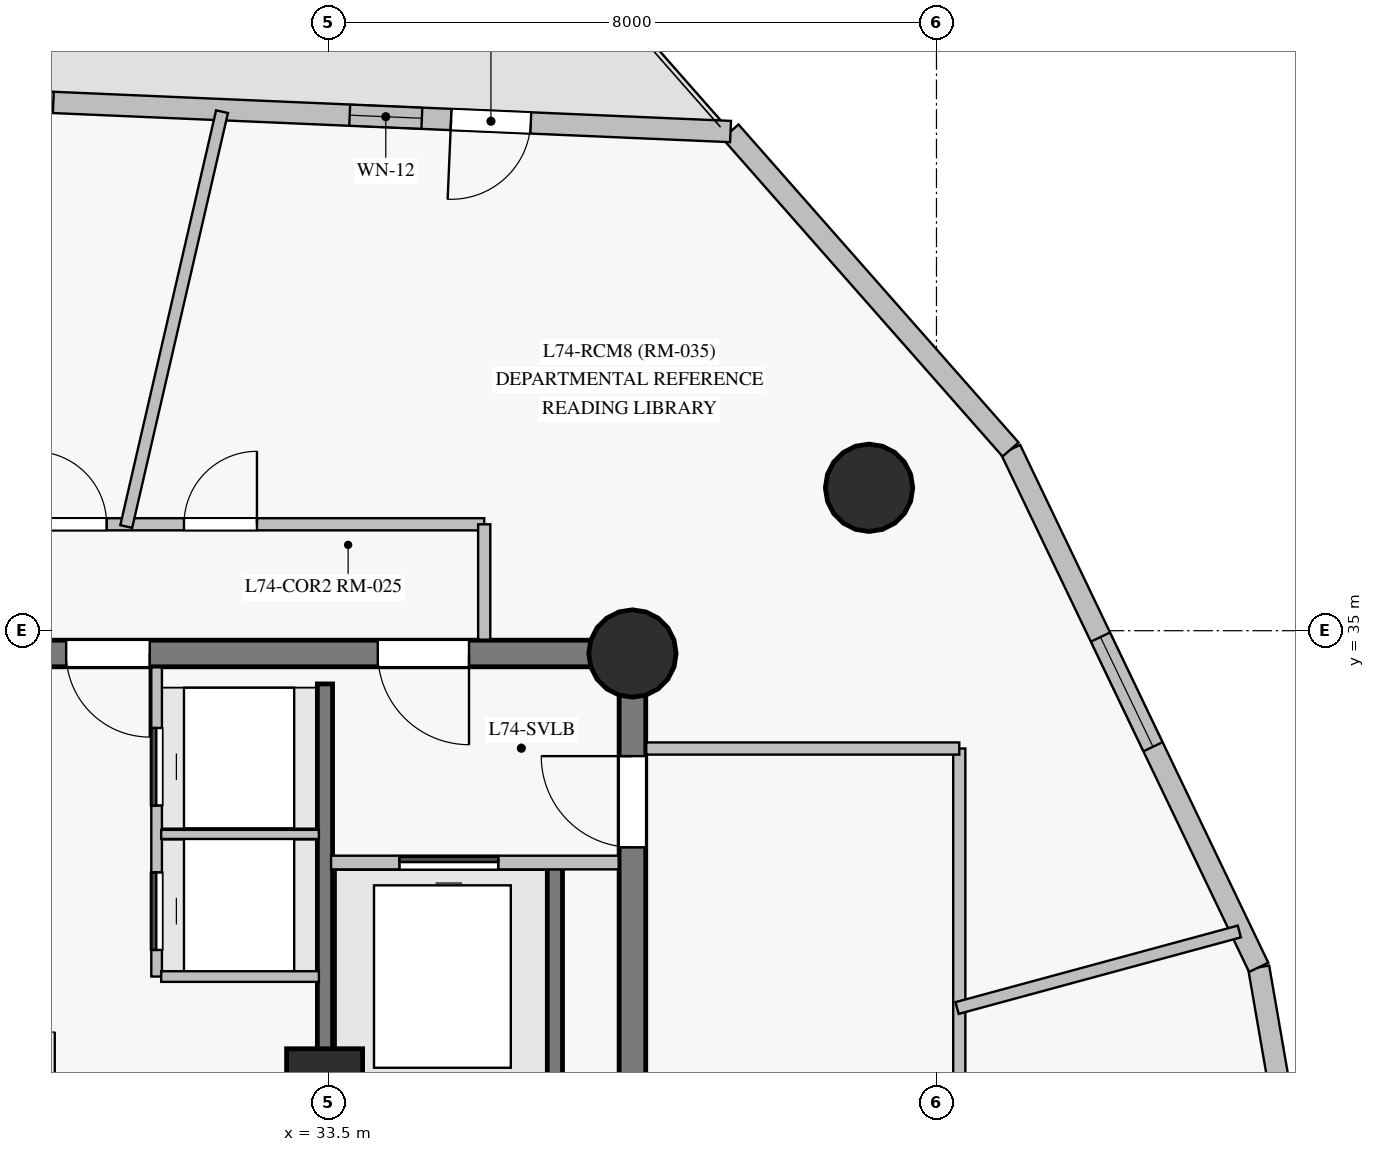
"""IFC4 building model, lengths in metres.
Left out: names, types, materials, properties, quantities, classifications, styles, units other than length and angle.
Written with IfcOpenShell. Run it as: python <this file> out.ifc"""

import sys

from ifc_helpers import new_model, si_unit, direction, frame, frame_2d, origin, origin_with_axes, origin_2d, place, context, subcontext, project, spatial, rectangle, circle, extrude, source, transform, mapped, element, fill, save


model = new_model("IFC4")
c1 = context("Model", 3, precision=1e-05, world=origin(), true_north=direction((0.0, 1.0)))
c2 = subcontext(c1, "Body", "Model", "MODEL_VIEW")
j1 = project(units=[si_unit("LENGTHUNIT", "METRE"), si_unit("PLANEANGLEUNIT", "RADIAN")], contexts=[c1])
p1 = place(None, origin())
s1 = spatial("IfcSite", under=j1, at=p1, CompositionType="ELEMENT")
p2 = place(p1, origin())
s2 = spatial("IfcBuilding", under=s1, at=p2, CompositionType="ELEMENT")
p3 = place(p2, frame((0.0, 0.0, 250.45)))
s3 = spatial("IfcBuildingStorey", under=s2, at=p3, CompositionType="ELEMENT", Elevation=250.45)
p4 = place(p3, frame((37.5, 18.3, 0.0), z_axis=(0.0, 0.0, 1.0), x_axis=(0.0, 1.0, 0.0)))
e1 = element("IfcWall", 1, at=p4, inside=s3, PredefinedType="SHEAR", context=c2, shape_type="SweptSolid", body=[
    extrude(rectangle(XDim=16.4, YDim=0.35, at=frame_2d((8.2, 0.0))), origin(), (0.0, 0.0, 1.0), 2.85),
])
p5 = place(p4, frame((13.85, 0.0, 0.0)))
e2 = element("IfcOpeningElement", 2, at=p5, cuts=e1, PredefinedType="OPENING", context=c2, shape_type="SweptSolid", body=[
    extrude(rectangle(XDim=1.2, YDim=2.15, at=frame_2d((0.6, 1.075))), frame((0.0, 0.185, 0.0), z_axis=(0.0, -1.0, 0.0), x_axis=(1.0, 0.0, 0.0)), (0.0, 0.0, 1.0), 0.37),
])
p6 = place(p3, frame((37.5, 34.7, 0.0), z_axis=(0.0, 0.0, 1.0), x_axis=(-1.0, 0.0, 0.0)))
e3 = element("IfcWall", 3, at=p6, inside=s3, PredefinedType="SHEAR", context=c2, shape_type="SweptSolid", body=[
    extrude(rectangle(XDim=10.95, YDim=0.35, at=frame_2d((5.475, 0.0))), origin(), (0.0, 0.0, 1.0), 2.85),
])
p7 = place(p6, frame((2.15, 0.0, 0.0)))
e4 = element("IfcOpeningElement", 4, at=p7, cuts=e3, PredefinedType="OPENING", context=c2, shape_type="SweptSolid", body=[
    extrude(rectangle(XDim=1.2, YDim=2.15, at=frame_2d((0.6, 1.075))), frame((0.0, 0.185, 0.0), z_axis=(0.0, -1.0, 0.0), x_axis=(1.0, 0.0, 0.0)), (0.0, 0.0, 1.0), 0.37),
])
p8 = place(p6, frame((6.35, 0.0, 0.0)))
e5 = element("IfcOpeningElement", 5, at=p8, cuts=e3, PredefinedType="OPENING", context=c2, shape_type="SweptSolid", body=[
    extrude(rectangle(XDim=1.1, YDim=2.15, at=frame_2d((0.55, 1.075))), frame((0.0, 0.185, 0.0), z_axis=(0.0, -1.0, 0.0), x_axis=(1.0, 0.0, 0.0)), (0.0, 0.0, 1.0), 0.37),
])
m1 = source(origin_with_axes(), c2, "Body", "SweptSolid", [
    extrude(circle(Radius=0.575, at=origin_2d()), origin(), (0.0, 0.0, 1.0), 3.05),
])
p9 = place(p3, frame((37.5, 34.7, 0.0), z_axis=(0.0, 0.0, 1.0), x_axis=(1.0, 0.0, 0.0)))
e6 = element("IfcColumn", 6, at=p9, inside=s3, PredefinedType="COLUMN", context=c2, shape_type="MappedRepresentation", body=[
    mapped(m1, transform((0.0, 0.0, 0.0), scale=1.0)),
])
m2 = source(origin_with_axes(), c2, "Body", "SweptSolid", [
    extrude(rectangle(XDim=1.0, YDim=1.0, at=origin_2d()), origin(), (0.0, 0.0, 1.0), 3.05),
])
p10 = place(p3, frame((33.45, 29.0, 0.0), z_axis=(0.0, 0.0, 1.0), x_axis=(1.0, 0.0, 0.0)))
e7 = element("IfcColumn", 7, at=p10, inside=s3, PredefinedType="COLUMN", context=c2, shape_type="MappedRepresentation", body=[
    mapped(m2, transform((0.0, 0.0, 0.0), scale=1.0)),
])
p11 = place(p3, frame((40.613, 36.88, 0.0), z_axis=(0.0, 0.0, 1.0), x_axis=(1.0, 0.0, 0.0)))
e8 = element("IfcColumn", 8, at=p11, inside=s3, PredefinedType="COLUMN", context=c2, shape_type="MappedRepresentation", body=[
    mapped(m1, transform((0.0, 0.0, 0.0), scale=1.0)),
])
p12 = place(p3, frame((47.625, 19.683, 0.0), z_axis=(0.0, 0.0, 1.0), x_axis=(-0.170672613097, 0.985327792736, 0.0)))
e9 = element("IfcWall", 9, at=p12, inside=s3, PredefinedType="SOLIDWALL", context=c2, shape_type="SweptSolid", body=[
    extrude(rectangle(XDim=11.05, YDim=0.28, at=frame_2d((5.525, 0.0))), origin(), (0.0, 0.0, 1.0), 2.85),
])
p13 = place(p12, frame((0.509, 0.0, 0.85)))
e10 = element("IfcOpeningElement", 10, at=p13, cuts=e9, PredefinedType="OPENING", context=c2, shape_type="SweptSolid", body=[
    extrude(rectangle(XDim=1.6, YDim=1.6, at=frame_2d((0.8, 0.8))), frame((0.0, 0.15, 0.0), z_axis=(0.0, -1.0, 0.0), x_axis=(1.0, 0.0, 0.0)), (0.0, 0.0, 1.0), 0.3),
])
p14 = place(p12, frame((4.026, 0.0, 0.85)))
e11 = element("IfcOpeningElement", 11, at=p14, cuts=e9, PredefinedType="OPENING", context=c2, shape_type="SweptSolid", body=[
    extrude(rectangle(XDim=1.6, YDim=1.6, at=frame_2d((0.8, 0.8))), frame((0.0, 0.15, 0.0), z_axis=(0.0, -1.0, 0.0), x_axis=(1.0, 0.0, 0.0)), (0.0, 0.0, 1.0), 0.3),
])
p15 = place(p12, frame((7.922, 0.0, 0.85)))
e12 = element("IfcOpeningElement", 12, at=p15, cuts=e9, PredefinedType="OPENING", context=c2, shape_type="SweptSolid", body=[
    extrude(rectangle(XDim=1.6, YDim=1.6, at=frame_2d((0.8, 0.8))), frame((0.0, 0.15, 0.0), z_axis=(0.0, -1.0, 0.0), x_axis=(1.0, 0.0, 0.0)), (0.0, 0.0, 1.0), 0.3),
])
p16 = place(p3, frame((45.739, 30.571, 0.0), z_axis=(0.0, 0.0, 1.0), x_axis=(-0.432090063986, 0.901830458903, 0.0)))
e13 = element("IfcWall", 13, at=p16, inside=s3, PredefinedType="SOLIDWALL", context=c2, shape_type="SweptSolid", body=[
    extrude(rectangle(XDim=7.554, YDim=0.28, at=frame_2d((3.777, 0.0))), origin(), (0.0, 0.0, 1.0), 2.85),
])
p17 = place(p16, frame((3.218, 0.0, 0.85)))
e14 = element("IfcOpeningElement", 14, at=p17, cuts=e13, PredefinedType="OPENING", context=c2, shape_type="SweptSolid", body=[
    extrude(rectangle(XDim=1.6, YDim=1.6, at=frame_2d((0.8, 0.8))), frame((0.0, 0.15, 0.0), z_axis=(0.0, -1.0, 0.0), x_axis=(1.0, 0.0, 0.0)), (0.0, 0.0, 1.0), 0.3),
])
p18 = place(p3, frame((42.475, 37.384, 0.0), z_axis=(0.0, 0.0, 1.0), x_axis=(-0.660950688605, 0.75042933527, 0.0)))
e15 = element("IfcWall", 15, at=p18, inside=s3, PredefinedType="SOLIDWALL", context=c2, shape_type="SweptSolid", body=[
    extrude(rectangle(XDim=5.574, YDim=0.28, at=frame_2d((2.787, 0.0))), origin(), (0.0, 0.0, 1.0), 2.85),
])
p19 = place(p3, frame((38.791, 41.567, 0.0), z_axis=(0.0, 0.0, 1.0), x_axis=(-0.999077907862, 0.042934065981, 0.0)))
e16 = element("IfcWall", 16, at=p19, inside=s3, PredefinedType="SOLIDWALL", context=c2, shape_type="SweptSolid", body=[
    extrude(rectangle(XDim=18.93, YDim=0.28, at=frame_2d((9.465, 0.0))), origin(), (0.0, 0.0, 1.0), 2.52),
])
p20 = place(p19, frame((4.065, 0.0, 0.85)))
e17 = element("IfcOpeningElement", 17, at=p20, cuts=e16, PredefinedType="OPENING", context=c2, shape_type="SweptSolid", body=[
    extrude(rectangle(XDim=0.95, YDim=1.5, at=frame_2d((0.475, 0.75))), frame((0.0, 0.15, 0.0), z_axis=(0.0, -1.0, 0.0), x_axis=(1.0, 0.0, 0.0)), (0.0, 0.0, 1.0), 0.3),
])
p21 = place(p19, frame((8.918, 0.0, 0.85)))
e18 = element("IfcOpeningElement", 18, at=p21, cuts=e16, PredefinedType="OPENING", context=c2, shape_type="SweptSolid", body=[
    extrude(rectangle(XDim=0.95, YDim=1.5, at=frame_2d((0.475, 0.75))), frame((0.0, 0.15, 0.0), z_axis=(0.0, -1.0, 0.0), x_axis=(1.0, 0.0, 0.0)), (0.0, 0.0, 1.0), 0.3),
])
p22 = place(p19, frame((13.66, 0.0, 0.85)))
e19 = element("IfcOpeningElement", 19, at=p22, cuts=e16, PredefinedType="OPENING", context=c2, shape_type="SweptSolid", body=[
    extrude(rectangle(XDim=0.95, YDim=1.5, at=frame_2d((0.475, 0.75))), frame((0.0, 0.15, 0.0), z_axis=(0.0, -1.0, 0.0), x_axis=(1.0, 0.0, 0.0)), (0.0, 0.0, 1.0), 0.3),
])
p23 = place(p19, frame((2.63, 0.0, 0.0)))
e20 = element("IfcOpeningElement", 20, at=p23, cuts=e16, PredefinedType="OPENING", context=c2, shape_type="SweptSolid", body=[
    extrude(rectangle(XDim=1.05, YDim=2.12, at=frame_2d((0.525, 1.06))), frame((0.0, 0.15, 0.0), z_axis=(0.0, -1.0, 0.0), x_axis=(1.0, 0.0, 0.0)), (0.0, 0.0, 1.0), 0.3),
])
p24 = place(p3, frame((33.455, 18.7, 0.0), z_axis=(0.0, 0.0, 1.0), x_axis=(0.0, 1.0, 0.0)))
e21 = element("IfcWall", 21, at=p24, inside=s3, PredefinedType="SHEAR", context=c2, shape_type="SweptSolid", body=[
    extrude(rectangle(XDim=15.6, YDim=0.2, at=frame_2d((7.8, 0.0))), origin(), (0.0, 0.0, 1.0), 2.85),
])
p25 = place(p24, frame((2.75, 0.0, 0.0)))
e22 = element("IfcOpeningElement", 22, at=p25, cuts=e21, PredefinedType="OPENING", context=c2, shape_type="SweptSolid", body=[
    extrude(rectangle(XDim=1.15, YDim=2.15, at=frame_2d((0.575, 1.075))), frame((0.0, 0.11, 0.0), z_axis=(0.0, -1.0, 0.0), x_axis=(1.0, 0.0, 0.0)), (0.0, 0.0, 1.0), 0.22),
])
p26 = place(p24, frame((0.55, 0.0, 0.0)))
e23 = element("IfcOpeningElement", 23, at=p26, cuts=e21, PredefinedType="OPENING", context=c2, shape_type="SweptSolid", body=[
    extrude(rectangle(XDim=0.94, YDim=2.1, at=frame_2d((0.47, 1.05))), frame((0.0, 0.11, 0.0), z_axis=(0.0, -1.0, 0.0), x_axis=(1.0, 0.0, 0.0)), (0.0, 0.0, 1.0), 0.22),
])
p27 = place(p3, frame((36.48, 29.02, 0.0), z_axis=(0.0, 0.0, 1.0), x_axis=(0.0, 1.0, 0.0)))
e24 = element("IfcWall", 24, at=p27, inside=s3, PredefinedType="SHEAR", context=c2, shape_type="SweptSolid", body=[
    extrude(rectangle(XDim=2.86, YDim=0.2, at=frame_2d((1.43, 0.0))), origin(), (0.0, 0.0, 1.0), 2.85),
])
p28 = place(p3, frame((41.8, 33.45, 0.0), z_axis=(0.0, 0.0, 1.0), x_axis=(0.0, -1.0, 0.0)))
e25 = element("IfcWall", 25, at=p28, inside=s3, PredefinedType="PARTITIONING", context=c2, shape_type="SweptSolid", body=[
    extrude(rectangle(XDim=19.6, YDim=0.16, at=frame_2d((9.8, 0.0))), origin(), (0.0, 0.0, 1.0), 2.3),
])
p29 = place(p28, frame((12.265, 0.0, 0.0)))
e26 = element("IfcOpeningElement", 26, at=p29, cuts=e25, PredefinedType="OPENING", context=c2, shape_type="SweptSolid", body=[
    extrude(rectangle(XDim=0.96, YDim=2.15, at=frame_2d((0.48, 1.075))), frame((0.0, 0.09, 0.0), z_axis=(0.0, -1.0, 0.0), x_axis=(1.0, 0.0, 0.0)), (0.0, 0.0, 1.0), 0.18),
])
p30 = place(p28, frame((8.835, 0.0, 0.0)))
e27 = element("IfcOpeningElement", 27, at=p30, cuts=e25, PredefinedType="OPENING", context=c2, shape_type="SweptSolid", body=[
    extrude(rectangle(XDim=0.96, YDim=2.15, at=frame_2d((0.48, 1.075))), frame((0.0, 0.09, 0.0), z_axis=(0.0, -1.0, 0.0), x_axis=(1.0, 0.0, 0.0)), (0.0, 0.0, 1.0), 0.18),
])
p31 = place(p3, frame((28.6, 36.4, 0.0), z_axis=(0.0, 0.0, 1.0), x_axis=(1.0, 0.0, 0.0)))
e28 = element("IfcWall", 28, at=p31, inside=s3, PredefinedType="PARTITIONING", context=c2, shape_type="SweptSolid", body=[
    extrude(rectangle(XDim=6.95, YDim=0.16, at=frame_2d((3.475, 0.0))), origin(), (0.0, 0.0, 1.0), 2.45),
])
p32 = place(p31, frame((3.0, 0.0, 0.0)))
e29 = element("IfcOpeningElement", 29, at=p32, cuts=e28, PredefinedType="OPENING", context=c2, shape_type="SweptSolid", body=[
    extrude(rectangle(XDim=0.96, YDim=2.15, at=frame_2d((0.48, 1.075))), frame((0.0, 0.09, 0.0), z_axis=(0.0, -1.0, 0.0), x_axis=(1.0, 0.0, 0.0)), (0.0, 0.0, 1.0), 0.18),
])
p33 = place(p31, frame((1.022, 0.0, 0.0)))
e30 = element("IfcOpeningElement", 30, at=p33, cuts=e28, PredefinedType="OPENING", context=c2, shape_type="SweptSolid", body=[
    extrude(rectangle(XDim=0.96, YDim=2.15, at=frame_2d((0.48, 1.075))), frame((0.0, 0.09, 0.0), z_axis=(0.0, -1.0, 0.0), x_axis=(1.0, 0.0, 0.0)), (0.0, 0.0, 1.0), 0.18),
])
p34 = place(p3, frame((30.84, 36.371, 0.0), z_axis=(0.0, 0.0, 1.0), x_axis=(0.224990017286, 0.974361068661, 0.0)))
e31 = element("IfcWall", 31, at=p34, inside=s3, PredefinedType="PARTITIONING", context=c2, shape_type="SweptSolid", body=[
    extrude(rectangle(XDim=5.601, YDim=0.16, at=frame_2d((2.801, 0.0))), origin(), (0.0, 0.0, 1.0), 2.85),
])
p35 = place(p3, frame((37.682, 33.45, 0.0), z_axis=(0.0, 0.0, 1.0), x_axis=(1.0, 0.0, 0.0)))
e32 = element("IfcWall", 32, at=p35, inside=s3, PredefinedType="PARTITIONING", context=c2, shape_type="SweptSolid", body=[
    extrude(rectangle(XDim=4.118, YDim=0.16, at=frame_2d((2.059, 0.0))), origin(), (0.0, 0.0, 1.0), 2.85),
])
p36 = place(p3, frame((31.24, 30.45, 0.0), z_axis=(0.0, 0.0, 1.0), x_axis=(0.0, 1.0, 0.0)))
e33 = element("IfcWall", 33, at=p36, inside=s3, PredefinedType="PARTITIONING", context=c2, shape_type="SweptSolid", body=[
    extrude(rectangle(XDim=4.068, YDim=0.14, at=frame_2d((2.034, 0.0))), origin(), (0.0, 0.0, 1.0), 2.85),
])
p37 = place(p36, frame((0.35, 0.0, 0.0)))
e34 = element("IfcOpeningElement", 34, at=p37, cuts=e33, PredefinedType="OPENING", context=c2, shape_type="SweptSolid", body=[
    extrude(rectangle(XDim=1.02, YDim=2.15, at=frame_2d((0.51, 1.075))), frame((0.0, 0.08, 0.0), z_axis=(0.0, -1.0, 0.0), x_axis=(1.0, 0.0, 0.0)), (0.0, 0.0, 1.0), 0.16),
])
p38 = place(p36, frame((2.25, 0.0, 0.0)))
e35 = element("IfcOpeningElement", 35, at=p38, cuts=e33, PredefinedType="OPENING", context=c2, shape_type="SweptSolid", body=[
    extrude(rectangle(XDim=1.02, YDim=2.15, at=frame_2d((0.51, 1.075))), frame((0.0, 0.08, 0.0), z_axis=(0.0, -1.0, 0.0), x_axis=(1.0, 0.0, 0.0)), (0.0, 0.0, 1.0), 0.16),
])
p39 = place(p3, frame((41.771, 30.036, 0.0), z_axis=(0.0, 0.0, 1.0), x_axis=(0.965147934971, 0.261704917077, 0.0)))
e36 = element("IfcWall", 36, at=p39, inside=s3, PredefinedType="PARTITIONING", context=c2, shape_type="SweptSolid", body=[
    extrude(rectangle(XDim=3.847, YDim=0.16, at=frame_2d((1.924, 0.0))), origin(), (0.0, 0.0, 1.0), 2.85),
])
p40 = place(p3, frame((33.535, 31.95, 0.0), z_axis=(0.0, 0.0, 1.0), x_axis=(1.0, 0.0, 0.0)))
e37 = element("IfcWall", 37, at=p40, inside=s3, PredefinedType="PARTITIONING", context=c2, shape_type="SweptSolid", body=[
    extrude(rectangle(XDim=3.784, YDim=0.18, at=frame_2d((1.892, 0.0))), origin(), (0.0, 0.0, 1.0), 2.85),
])
p41 = place(p40, frame((0.9, 0.0, 0.0)))
e38 = element("IfcOpeningElement", 38, at=p41, cuts=e37, PredefinedType="OPENING", context=c2, shape_type="SweptSolid", body=[
    extrude(rectangle(XDim=1.3, YDim=2.2, at=frame_2d((0.65, 1.1))), frame((0.0, 0.1, 0.0), z_axis=(0.0, -1.0, 0.0), x_axis=(1.0, 0.0, 0.0)), (0.0, 0.0, 1.0), 0.2),
])
p42 = place(p3, frame((31.3, 30.45, 0.0), z_axis=(0.0, 0.0, 1.0), x_axis=(1.0, 0.0, 0.0)))
e39 = element("IfcWall", 39, at=p42, inside=s3, PredefinedType="PARTITIONING", context=c2, shape_type="SweptSolid", body=[
    extrude(rectangle(XDim=2.075, YDim=0.14, at=frame_2d((1.038, 0.0))), origin(), (0.0, 0.0, 1.0), 2.85),
])
p43 = place(p3, frame((31.3, 32.32, 0.0), z_axis=(0.0, 0.0, 1.0), x_axis=(1.0, 0.0, 0.0)))
e40 = element("IfcWall", 40, at=p43, inside=s3, PredefinedType="PARTITIONING", context=c2, shape_type="SweptSolid", body=[
    extrude(rectangle(XDim=2.075, YDim=0.12, at=frame_2d((1.038, 0.0))), origin(), (0.0, 0.0, 1.0), 2.85),
])
p44 = place(p3, frame((35.55, 36.4, 0.0), z_axis=(0.0, 0.0, 1.0), x_axis=(0.0, -1.0, 0.0)))
e41 = element("IfcWall", 41, at=p44, inside=s3, PredefinedType="PARTITIONING", context=c2, shape_type="SweptSolid", body=[
    extrude(rectangle(XDim=1.518, YDim=0.16, at=frame_2d((0.759, 0.0))), origin(), (0.0, 0.0, 1.0), 2.85),
])
m3 = source(origin_with_axes(), c2, "Body", "SweptSolid", [
    extrude(rectangle(XDim=1.6, YDim=1.6, at=frame_2d((0.8, 0.8))), frame((0.0, 0.03, 0.0), z_axis=(0.0, -1.0, 0.0), x_axis=(1.0, 0.0, 0.0)), (0.0, 0.0, 1.0), 0.06),
])
p45 = place(p17, origin())
e42 = element("IfcWindow", 42, at=p45, inside=s3, PartitioningType="SINGLE_PANEL", PredefinedType="WINDOW", context=c2, shape_type="MappedRepresentation", body=[
    mapped(m3, transform((0.0, 0.0, 0.0), scale=1.0)),
])
fill(e14, e42)
m4 = source(origin_with_axes(), c2, "Body", "SweptSolid", [
    extrude(rectangle(XDim=0.95, YDim=1.5, at=frame_2d((0.475, 0.75))), frame((0.0, 0.03, 0.0), z_axis=(0.0, -1.0, 0.0), x_axis=(1.0, 0.0, 0.0)), (0.0, 0.0, 1.0), 0.06),
])
p46 = place(p20, origin())
e43 = element("IfcWindow", 43, at=p46, inside=s3, PartitioningType="SINGLE_PANEL", PredefinedType="WINDOW", context=c2, shape_type="MappedRepresentation", body=[
    mapped(m4, transform((0.0, 0.0, 0.0), scale=1.0)),
])
fill(e17, e43)
p47 = place(p21, origin())
e44 = element("IfcWindow", 44, at=p47, inside=s3, PartitioningType="SINGLE_PANEL", PredefinedType="WINDOW", context=c2, shape_type="MappedRepresentation", body=[
    mapped(m4, transform((0.0, 0.0, 0.0), scale=1.0)),
])
fill(e18, e44)
m5 = source(origin_with_axes(), c2, "Body", "SweptSolid", [
    extrude(rectangle(XDim=1.05, YDim=2.12, at=frame_2d((0.525, 1.06))), frame((0.0, 0.025, 0.0), z_axis=(0.0, -1.0, 0.0), x_axis=(1.0, 0.0, 0.0)), (0.0, 0.0, 1.0), 0.05),
])
p48 = place(p23, origin())
e45 = element("IfcDoor", 45, at=p48, inside=s3, OperationType="SINGLE_SWING_RIGHT", PredefinedType="DOOR", context=c2, shape_type="MappedRepresentation", body=[
    mapped(m5, transform((0.0, 0.0, 0.0), scale=1.0)),
])
fill(e20, e45)
m6 = source(origin_with_axes(), c2, "Body", "SweptSolid", [
    extrude(rectangle(XDim=1.2, YDim=2.15, at=frame_2d((0.6, 1.075))), frame((0.0, 0.025, 0.0), z_axis=(0.0, -1.0, 0.0), x_axis=(1.0, 0.0, 0.0)), (0.0, 0.0, 1.0), 0.05),
])
p49 = place(p5, origin())
e46 = element("IfcDoor", 46, at=p49, inside=s3, OperationType="SINGLE_SWING_RIGHT", PredefinedType="DOOR", context=c2, shape_type="MappedRepresentation", body=[
    mapped(m6, transform((0.0, 0.0, 0.0), scale=1.0)),
])
fill(e2, e46)
p50 = place(p7, origin())
e47 = element("IfcDoor", 47, at=p50, inside=s3, OperationType="SINGLE_SWING_LEFT", PredefinedType="DOOR", context=c2, shape_type="MappedRepresentation", body=[
    mapped(m6, transform((0.0, 0.0, 0.0), scale=1.0)),
])
fill(e4, e47)
m7 = source(origin_with_axes(), c2, "Body", "SweptSolid", [
    extrude(rectangle(XDim=1.3, YDim=2.2, at=frame_2d((0.65, 1.1))), frame((0.0, 0.025, 0.0), z_axis=(0.0, -1.0, 0.0), x_axis=(1.0, 0.0, 0.0)), (0.0, 0.0, 1.0), 0.05),
])
p51 = place(p41, origin())
e48 = element("IfcDoor", 48, at=p51, inside=s3, OperationType="SLIDING_TO_LEFT", PredefinedType="DOOR", context=c2, shape_type="MappedRepresentation", body=[
    mapped(m7, transform((0.0, 0.0, 0.0), scale=1.0)),
])
fill(e38, e48)
m8 = source(origin_with_axes(), c2, "Body", "SweptSolid", [
    extrude(rectangle(XDim=1.1, YDim=2.15, at=frame_2d((0.55, 1.075))), frame((0.0, 0.025, 0.0), z_axis=(0.0, -1.0, 0.0), x_axis=(1.0, 0.0, 0.0)), (0.0, 0.0, 1.0), 0.05),
])
p52 = place(p8, origin())
e49 = element("IfcDoor", 49, at=p52, inside=s3, OperationType="SINGLE_SWING_LEFT", PredefinedType="DOOR", context=c2, shape_type="MappedRepresentation", body=[
    mapped(m8, transform((0.0, 0.0, 0.0), scale=1.0)),
])
fill(e5, e49)
m9 = source(origin_with_axes(), c2, "Body", "SweptSolid", [
    extrude(rectangle(XDim=1.02, YDim=2.15, at=frame_2d((0.51, 1.075))), frame((0.0, 0.025, 0.0), z_axis=(0.0, -1.0, 0.0), x_axis=(1.0, 0.0, 0.0)), (0.0, 0.0, 1.0), 0.05),
])
p53 = place(p37, origin())
e50 = element("IfcDoor", 50, at=p53, inside=s3, OperationType="SLIDING_TO_LEFT", PredefinedType="DOOR", context=c2, shape_type="MappedRepresentation", body=[
    mapped(m9, transform((0.0, 0.0, 0.0), scale=1.0)),
])
fill(e34, e50)
p54 = place(p38, origin())
e51 = element("IfcDoor", 51, at=p54, inside=s3, OperationType="SLIDING_TO_LEFT", PredefinedType="DOOR", context=c2, shape_type="MappedRepresentation", body=[
    mapped(m9, transform((0.0, 0.0, 0.0), scale=1.0)),
])
fill(e35, e51)
m10 = source(origin_with_axes(), c2, "Body", "SweptSolid", [
    extrude(rectangle(XDim=0.96, YDim=2.15, at=frame_2d((0.48, 1.075))), frame((0.0, 0.025, 0.0), z_axis=(0.0, -1.0, 0.0), x_axis=(1.0, 0.0, 0.0)), (0.0, 0.0, 1.0), 0.05),
])
p55 = place(p32, origin())
e52 = element("IfcDoor", 52, at=p55, inside=s3, OperationType="SINGLE_SWING_RIGHT", PredefinedType="DOOR", context=c2, shape_type="MappedRepresentation", body=[
    mapped(m10, transform((0.0, 0.0, 0.0), scale=1.0)),
])
fill(e29, e52)
p56 = place(p33, origin())
e53 = element("IfcDoor", 53, at=p56, inside=s3, OperationType="SINGLE_SWING_LEFT", PredefinedType="DOOR", context=c2, shape_type="MappedRepresentation", body=[
    mapped(m10, transform((0.0, 0.0, 0.0), scale=1.0)),
])
fill(e30, e53)
save(model, sys.argv[1])
